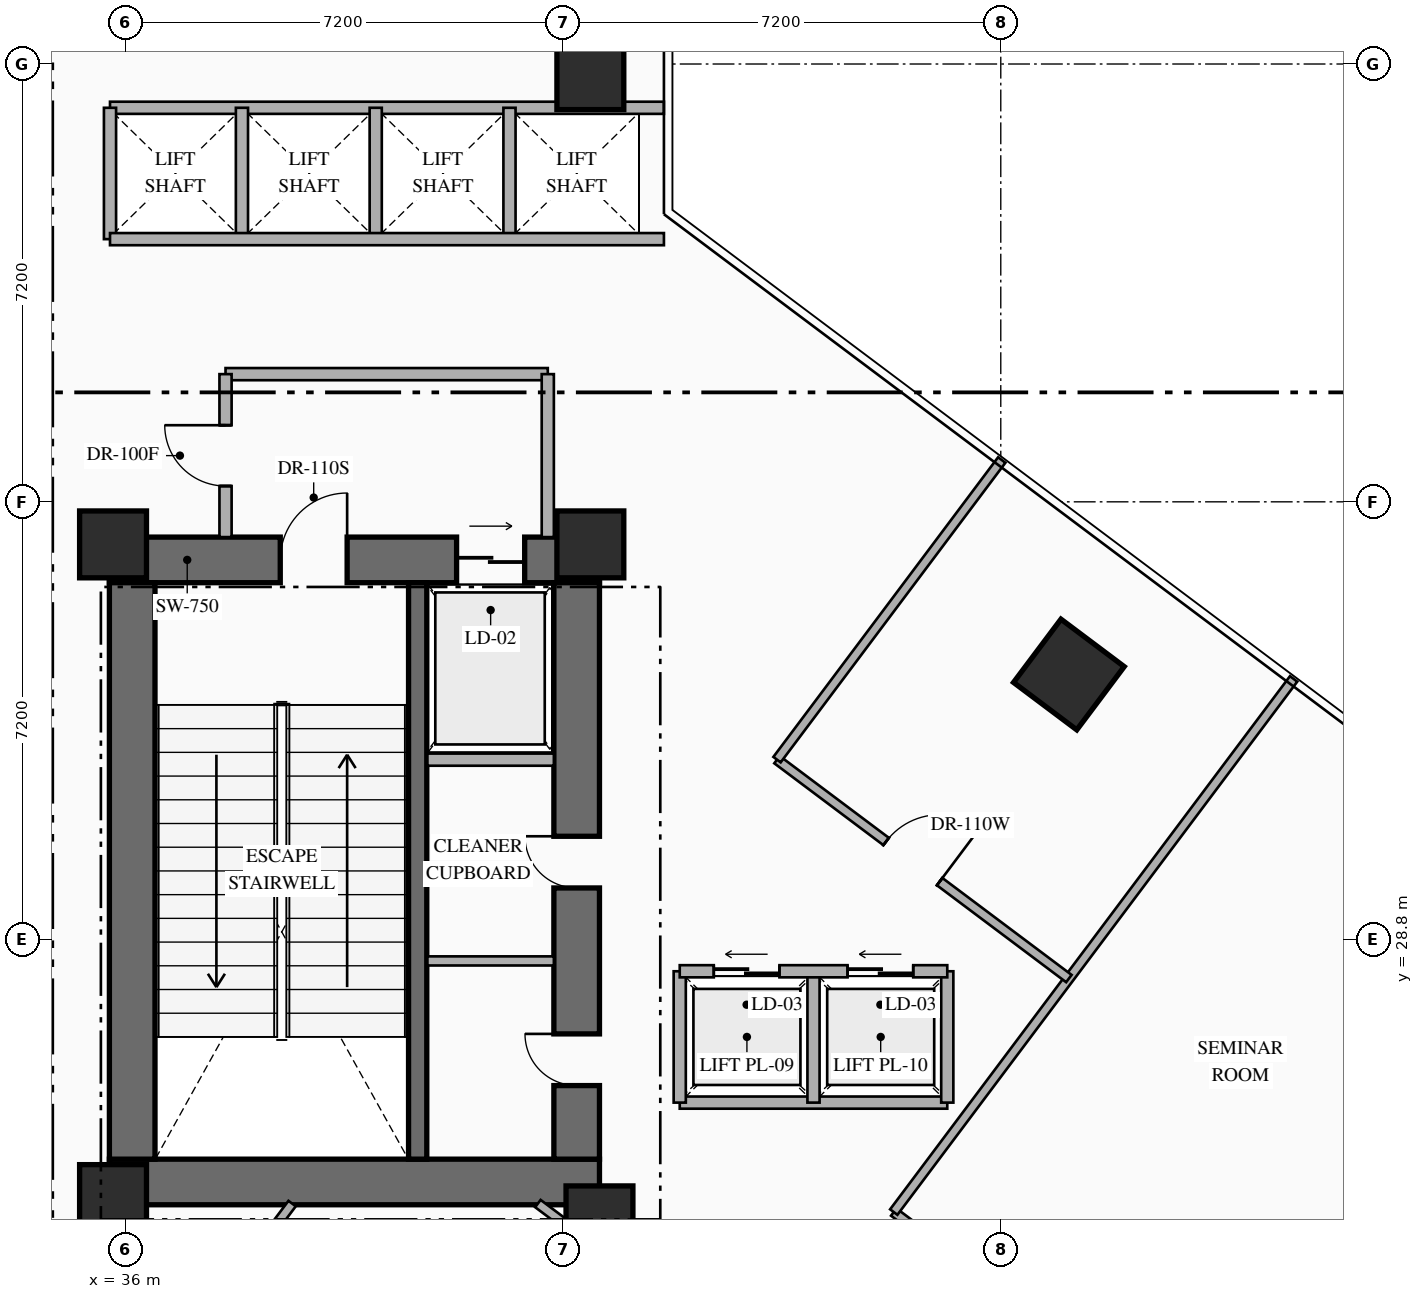
"""IFC4 building model, lengths in metres.
Left out: names, types, materials, properties, quantities, classifications, styles, units other than length and angle.
Written with IfcOpenShell. Run it as: python <this file> out.ifc"""

import sys

from ifc_helpers import new_model, si_unit, direction, frame, frame_2d, origin, origin_2d, place, context, subcontext, project, spatial, rectangle, extrude, element, fill, save


model = new_model("IFC4")
c1 = context("Model", 3, precision=1e-05, world=origin(), true_north=direction((0.0, 1.0)))
c2 = subcontext(c1, "Body", "Model", "MODEL_VIEW")
j1 = project(units=[si_unit("LENGTHUNIT", "METRE"), si_unit("PLANEANGLEUNIT", "RADIAN")], contexts=[c1])
p1 = place(None, origin())
s1 = spatial("IfcSite", under=j1, at=p1, CompositionType="ELEMENT")
p2 = place(p1, origin())
s2 = spatial("IfcBuilding", under=s1, at=p2, CompositionType="ELEMENT")
p3 = place(p2, frame((0.0, 0.0, 5.4)))
s3 = spatial("IfcBuildingStorey", under=s2, at=p3, CompositionType="ELEMENT", Elevation=5.4)
p4 = place(p3, frame((35.74, 24.815, 0.0), z_axis=(0.0, 0.0, 1.0), x_axis=(1.0, 0.0, 0.0)))
e1 = element("IfcWall", 1, at=p4, inside=s3, PredefinedType="SHEAR", context=c2, shape_type="SweptSolid", body=[
    extrude(rectangle(XDim=8.06, YDim=0.75, at=frame_2d((4.03, 0.0))), origin(), (0.0, 0.0, 1.0), 5.4),
])
p5 = place(p3, frame((35.74, 35.045, 0.0), z_axis=(0.0, 0.0, 1.0), x_axis=(1.0, 0.0, 0.0)))
e2 = element("IfcWall", 2, at=p5, inside=s3, PredefinedType="SHEAR", context=c2, shape_type="SweptSolid", body=[
    extrude(rectangle(XDim=8.06, YDim=0.75, at=frame_2d((4.03, 0.0))), origin(), (0.0, 0.0, 1.0), 5.4),
])
p6 = place(p5, frame((2.81, 0.0, 0.0)))
e3 = element("IfcOpeningElement", 3, at=p6, cuts=e2, PredefinedType="OPENING", context=c2, shape_type="SweptSolid", body=[
    extrude(rectangle(XDim=1.1, YDim=2.2, at=frame_2d((0.55, 1.1))), frame((0.0, 0.385, 0.0), z_axis=(0.0, -1.0, 0.0), x_axis=(1.0, 0.0, 0.0)), (0.0, 0.0, 1.0), 0.77),
])
p7 = place(p5, frame((5.71, 0.0, 0.0)))
e4 = element("IfcOpeningElement", 4, at=p7, cuts=e2, PredefinedType="OPENING", context=c2, shape_type="SweptSolid", body=[
    extrude(rectangle(XDim=1.12, YDim=2.15, at=frame_2d((0.56, 1.075))), frame((0.0, 0.385, 0.0), z_axis=(0.0, -1.0, 0.0), x_axis=(1.0, 0.0, 0.0)), (0.0, 0.0, 1.0), 0.77),
])
p8 = place(p3, frame((36.115, 25.19, 0.0), z_axis=(0.0, 0.0, 1.0), x_axis=(0.0, 1.0, 0.0)))
e5 = element("IfcWall", 5, at=p8, inside=s3, PredefinedType="SHEAR", context=c2, shape_type="SweptSolid", body=[
    extrude(rectangle(XDim=9.48, YDim=0.75, at=frame_2d((4.74, 0.0))), origin(), (0.0, 0.0, 1.0), 5.4),
])
p9 = place(p3, frame((43.425, 25.19, 0.0), z_axis=(0.0, 0.0, 1.0), x_axis=(0.0, 1.0, 0.0)))
e6 = element("IfcWall", 6, at=p9, inside=s3, PredefinedType="SHEAR", context=c2, shape_type="SweptSolid", body=[
    extrude(rectangle(XDim=9.48, YDim=0.75, at=frame_2d((4.74, 0.0))), origin(), (0.0, 0.0, 1.0), 5.4),
])
p10 = place(p9, frame((1.21, 0.0, 0.0)))
e7 = element("IfcOpeningElement", 7, at=p10, cuts=e6, PredefinedType="OPENING", context=c2, shape_type="SweptSolid", body=[
    extrude(rectangle(XDim=0.85, YDim=2.08, at=frame_2d((0.425, 1.04))), frame((0.0, 0.385, 0.0), z_axis=(0.0, -1.0, 0.0), x_axis=(1.0, 0.0, 0.0)), (0.0, 0.0, 1.0), 0.77),
])
p11 = place(p9, frame((4.46, 0.0, 0.0)))
e8 = element("IfcOpeningElement", 8, at=p11, cuts=e6, PredefinedType="OPENING", context=c2, shape_type="SweptSolid", body=[
    extrude(rectangle(XDim=0.85, YDim=2.08, at=frame_2d((0.425, 1.04))), frame((0.0, 0.385, 0.0), z_axis=(0.0, -1.0, 0.0), x_axis=(1.0, 0.0, 0.0)), (0.0, 0.0, 1.0), 0.77),
])
p12 = place(p3, frame((40.81, 25.19, 0.0), z_axis=(0.0, 0.0, 1.0), x_axis=(0.0, 1.0, 0.0)))
e9 = element("IfcWall", 9, at=p12, inside=s3, PredefinedType="SHEAR", context=c2, shape_type="SweptSolid", body=[
    extrude(rectangle(XDim=9.48, YDim=0.3, at=frame_2d((4.74, 0.0))), origin(), (0.0, 0.0, 1.0), 5.4),
])
for number, where, z_axis, x_axis in (
    (10, (35.8, 24.55, 0.0), (0.0, 0.0, 1.0), (1.0, 0.0, 0.0)),
    (11, (43.8, 24.2, 0.0), (0.0, 0.0, 1.0), (1.0, 0.0, 0.0)),
    (12, (35.8, 35.3, 0.0), (0.0, 0.0, 1.0), (1.0, 0.0, 0.0)),
    (13, (43.65, 35.3, 0.0), (0.0, 0.0, 1.0), (1.0, 0.0, 0.0)),
    (14, (43.65, 43.0, 0.0), (0.0, 0.0, 1.0), (1.0, 0.0, 0.0)),
):
    element("IfcColumn", number, at=place(p3, frame(where, z_axis=z_axis, x_axis=x_axis)), inside=s3, PredefinedType="COLUMN", context=c2, shape_type="SweptSolid", body=[
        extrude(rectangle(XDim=1.1, YDim=1.1, at=origin_2d()), origin(), (0.0, 0.0, 1.0), 5.4),
    ])
p13 = place(p3, frame((51.52, 33.16, 0.0), z_axis=(0.0, 0.0, 1.0), x_axis=(0.799999996291, -0.600000004945, 0.0)))
e15 = element("IfcColumn", 15, at=p13, inside=s3, PredefinedType="COLUMN", context=c2, shape_type="SweptSolid", body=[
    extrude(rectangle(XDim=1.3, YDim=1.3, at=origin_2d()), origin(), (0.0, 0.0, 1.0), 5.4),
])
p14 = place(p3, frame((40.97, 31.76, 0.0), z_axis=(0.0, 0.0, 1.0), x_axis=(1.0, 0.0, 0.0)))
e16 = element("IfcWall", 16, at=p14, inside=s3, PredefinedType="STANDARD", context=c2, shape_type="SweptSolid", body=[
    extrude(rectangle(XDim=2.08, YDim=0.2, at=frame_2d((1.04, 0.0))), origin(), (0.0, 0.0, 1.0), 5.1),
])
p15 = place(p3, frame((40.97, 28.45, 0.0), z_axis=(0.0, 0.0, 1.0), x_axis=(1.0, 0.0, 0.0)))
e17 = element("IfcWall", 17, at=p15, inside=s3, PredefinedType="PARTITIONING", context=c2, shape_type="SweptSolid", body=[
    extrude(rectangle(XDim=2.08, YDim=0.15, at=frame_2d((1.04, 0.0))), origin(), (0.0, 0.0, 1.0), 5.1),
])
p16 = place(p3, frame((37.65, 38.1, 0.0), z_axis=(0.0, 0.0, 1.0), x_axis=(1.0, 0.0, 0.0)))
e18 = element("IfcWall", 18, at=p16, inside=s3, PredefinedType="STANDARD", context=c2, shape_type="SweptSolid", body=[
    extrude(rectangle(XDim=5.3, YDim=0.2, at=frame_2d((2.65, 0.0))), origin(), (0.0, 0.0, 1.0), 5.1),
])
p17 = place(p3, frame((42.95, 35.42, 0.0), z_axis=(0.0, 0.0, 1.0), x_axis=(0.0, 1.0, 0.0)))
e19 = element("IfcWall", 19, at=p17, inside=s3, PredefinedType="STANDARD", context=c2, shape_type="SweptSolid", body=[
    extrude(rectangle(XDim=2.68, YDim=0.2, at=frame_2d((1.34, 0.0))), origin(), (0.0, 0.0, 1.0), 5.1),
])
p18 = place(p3, frame((37.65, 35.42, 0.0), z_axis=(0.0, 0.0, 1.0), x_axis=(0.0, 1.0, 0.0)))
e20 = element("IfcWall", 20, at=p18, inside=s3, PredefinedType="STANDARD", context=c2, shape_type="SweptSolid", body=[
    extrude(rectangle(XDim=2.68, YDim=0.2, at=frame_2d((1.34, 0.0))), origin(), (0.0, 0.0, 1.0), 5.1),
])
p19 = place(p18, frame((0.84, 0.0, 0.0)))
e21 = element("IfcOpeningElement", 21, at=p19, cuts=e20, PredefinedType="OPENING", context=c2, shape_type="SweptSolid", body=[
    extrude(rectangle(XDim=1.0, YDim=2.2, at=frame_2d((0.5, 1.1))), frame((0.0, 0.11, 0.0), z_axis=(0.0, -1.0, 0.0), x_axis=(1.0, 0.0, 0.0)), (0.0, 0.0, 1.0), 0.22),
])
p20 = place(p3, frame((35.75, 42.48, 0.0), z_axis=(0.0, 0.0, 1.0), x_axis=(1.0, 0.0, 0.0)))
e22 = element("IfcWall", 22, at=p20, inside=s3, PredefinedType="STANDARD", context=c2, shape_type="SweptSolid", body=[
    extrude(rectangle(XDim=9.11, YDim=0.2, at=frame_2d((4.555, 0.0))), origin(), (0.0, 0.0, 1.0), 5.1),
])
for number, where, z_axis, x_axis in (
    (23, (35.75, 40.32, 0.0), (0.0, 0.0, 1.0), (0.0, 1.0, 0.0)),
    (24, (37.92, 40.32, 0.0), (0.0, 0.0, 1.0), (0.0, 1.0, 0.0)),
    (25, (40.12, 40.32, 0.0), (0.0, 0.0, 1.0), (0.0, 1.0, 0.0)),
    (26, (42.32, 40.32, 0.0), (0.0, 0.0, 1.0), (0.0, 1.0, 0.0)),
):
    element("IfcWall", number, at=place(p3, frame(where, z_axis=z_axis, x_axis=x_axis)), inside=s3, PredefinedType="STANDARD", context=c2, shape_type="SweptSolid", body=[
        extrude(rectangle(XDim=2.16, YDim=0.2, at=frame_2d((1.08, 0.0))), origin(), (0.0, 0.0, 1.0), 5.1),
    ])
p21 = place(p3, frame((35.75, 40.32, 0.0), z_axis=(0.0, 0.0, 1.0), x_axis=(1.0, 0.0, 0.0)))
e27 = element("IfcWall", 27, at=p21, inside=s3, PredefinedType="STANDARD", context=c2, shape_type="SweptSolid", body=[
    extrude(rectangle(XDim=9.11, YDim=0.2, at=frame_2d((4.555, 0.0))), origin(), (0.0, 0.0, 1.0), 5.1),
])
p22 = place(p3, frame((45.12, 26.12, 0.0), z_axis=(0.0, 0.0, 1.0), x_axis=(1.0, 0.0, 0.0)))
e28 = element("IfcWall", 28, at=p22, inside=s3, PredefinedType="STANDARD", context=c2, shape_type="SweptSolid", body=[
    extrude(rectangle(XDim=4.4, YDim=0.2, at=frame_2d((2.2, 0.0))), origin(), (0.0, 0.0, 1.0), 5.1),
])
for number, where, z_axis, x_axis in (
    (29, (45.12, 26.12, 0.0), (0.0, 0.0, 1.0), (0.0, 1.0, 0.0)),
    (30, (49.52, 26.12, 0.0), (0.0, 0.0, 1.0), (0.0, 1.0, 0.0)),
    (31, (47.32, 26.12, 0.0), (0.0, 0.0, 1.0), (0.0, 1.0, 0.0)),
):
    element("IfcWall", number, at=place(p3, frame(where, z_axis=z_axis, x_axis=x_axis)), inside=s3, PredefinedType="STANDARD", context=c2, shape_type="SweptSolid", body=[
        extrude(rectangle(XDim=2.16, YDim=0.2, at=frame_2d((1.08, 0.0))), origin(), (0.0, 0.0, 1.0), 5.1),
    ])
p23 = place(p3, frame((45.12, 28.28, 0.0), z_axis=(0.0, 0.0, 1.0), x_axis=(1.0, 0.0, 0.0)))
e32 = element("IfcWall", 32, at=p23, inside=s3, PredefinedType="STANDARD", context=c2, shape_type="SweptSolid", body=[
    extrude(rectangle(XDim=4.4, YDim=0.2, at=frame_2d((2.2, 0.0))), origin(), (0.0, 0.0, 1.0), 5.1),
])
p24 = place(p23, frame((0.56, 0.0, 0.0)))
e33 = element("IfcOpeningElement", 33, at=p24, cuts=e32, PredefinedType="OPENING", context=c2, shape_type="SweptSolid", body=[
    extrude(rectangle(XDim=1.08, YDim=2.15, at=frame_2d((0.54, 1.075))), frame((0.0, 0.11, 0.0), z_axis=(0.0, -1.0, 0.0), x_axis=(1.0, 0.0, 0.0)), (0.0, 0.0, 1.0), 0.22),
])
p25 = place(p23, frame((2.76, 0.0, 0.0)))
e34 = element("IfcOpeningElement", 34, at=p25, cuts=e32, PredefinedType="OPENING", context=c2, shape_type="SweptSolid", body=[
    extrude(rectangle(XDim=1.08, YDim=2.15, at=frame_2d((0.54, 1.075))), frame((0.0, 0.11, 0.0), z_axis=(0.0, -1.0, 0.0), x_axis=(1.0, 0.0, 0.0)), (0.0, 0.0, 1.0), 0.22),
])
p26 = place(p3, frame((48.64, 24.32, 0.0), z_axis=(0.0, 0.0, 1.0), x_axis=(0.80000474051, -0.599993679268, 0.0)))
e35 = element("IfcWall", 35, at=p26, inside=s3, PredefinedType="PARTITIONING", context=c2, shape_type="SweptSolid", body=[
    extrude(rectangle(XDim=6.18, YDim=0.15, at=frame_2d((3.09, 0.0))), origin(), (0.0, 0.0, 1.0), 5.1),
])
p27 = place(p26, frame((2.59, 0.0, 0.0)))
e36 = element("IfcOpeningElement", 36, at=p27, cuts=e35, PredefinedType="OPENING", context=c2, shape_type="SweptSolid", body=[
    extrude(rectangle(XDim=1.0, YDim=2.15, at=frame_2d((0.5, 1.075))), frame((0.0, 0.085, 0.0), z_axis=(0.0, -1.0, 0.0), x_axis=(1.0, 0.0, 0.0)), (0.0, 0.0, 1.0), 0.17),
])
p28 = place(p3, frame((48.64, 24.32, 0.0), z_axis=(0.0, 0.0, 1.0), x_axis=(0.600017820398, 0.799986634391, 0.0)))
e37 = element("IfcWall", 37, at=p28, inside=s3, PredefinedType="PARTITIONING", context=c2, shape_type="SweptSolid", body=[
    extrude(rectangle(XDim=10.96, YDim=0.15, at=frame_2d((5.48, 0.0))), origin(), (0.0, 0.0, 1.0), 5.1),
])
p29 = place(p3, frame((53.584, 20.612, 0.0), z_axis=(0.0, 0.0, 1.0), x_axis=(0.600003564151, 0.799997326874, 0.0)))
e38 = element("IfcWall", 38, at=p29, inside=s3, PredefinedType="PARTITIONING", context=c2, shape_type="SweptSolid", body=[
    extrude(rectangle(XDim=10.96, YDim=0.15, at=frame_2d((5.48, 0.0))), origin(), (0.0, 0.0, 1.0), 5.1),
])
p30 = place(p3, frame((46.72, 31.76, 0.0), z_axis=(0.0, 0.0, 1.0), x_axis=(0.79999511724, -0.600006510291, 0.0)))
e39 = element("IfcWall", 39, at=p30, inside=s3, PredefinedType="PARTITIONING", context=c2, shape_type="SweptSolid", body=[
    extrude(rectangle(XDim=6.0, YDim=0.15, at=frame_2d((3.0, 0.0))), origin(), (0.0, 0.0, 1.0), 5.1),
])
p31 = place(p30, frame((2.243, 0.0, 0.0)))
e40 = element("IfcOpeningElement", 40, at=p31, cuts=e39, PredefinedType="OPENING", context=c2, shape_type="SweptSolid", body=[
    extrude(rectangle(XDim=1.1, YDim=2.16, at=frame_2d((0.55, 1.08))), frame((0.0, 0.085, 0.0), z_axis=(0.0, -1.0, 0.0), x_axis=(1.0, 0.0, 0.0)), (0.0, 0.0, 1.0), 0.17),
])
p32 = place(p3, frame((46.72, 31.76, 0.0), z_axis=(0.0, 0.0, 1.0), x_axis=(0.600006341286, 0.799995243996, 0.0)))
e41 = element("IfcWall", 41, at=p32, inside=s3, PredefinedType="PARTITIONING", context=c2, shape_type="SweptSolid", body=[
    extrude(rectangle(XDim=6.16, YDim=0.15, at=frame_2d((3.08, 0.0))), origin(), (0.0, 0.0, 1.0), 5.1),
])
p33 = place(p3, frame((42.787, 24.46, 0.0), z_axis=(0.0, 0.0, 1.0), x_axis=(0.799971872363, -0.600037501685, 0.0)))
e42 = element("IfcWall", 42, at=p33, inside=s3, PredefinedType="PARTITIONING", context=c2, shape_type="SweptSolid", body=[
    extrude(rectangle(XDim=4.167, YDim=0.15, at=frame_2d((2.083, 0.0))), origin(), (0.0, 0.0, 1.0), 5.1),
])
p34 = place(p33, frame((2.468, 0.0, 0.0)))
e43 = element("IfcOpeningElement", 43, at=p34, cuts=e42, PredefinedType="OPENING", context=c2, shape_type="SweptSolid", body=[
    extrude(rectangle(XDim=0.95, YDim=2.15, at=frame_2d((0.475, 1.075))), frame((0.0, 0.085, 0.0), z_axis=(0.0, -1.0, 0.0), x_axis=(1.0, 0.0, 0.0)), (0.0, 0.0, 1.0), 0.17),
])
p35 = place(p3, frame((33.384, 17.312, 0.0), z_axis=(0.0, 0.0, 1.0), x_axis=(0.600008743659, 0.799993442181, 0.0)))
e44 = element("IfcWall", 44, at=p35, inside=s3, PredefinedType="PARTITIONING", context=c2, shape_type="SweptSolid", body=[
    extrude(rectangle(XDim=8.935, YDim=0.15, at=frame_2d((4.468, 0.0))), origin(), (0.0, 0.0, 1.0), 5.1),
])
p36 = place(p6, origin())
e45 = element("IfcDoor", 45, at=p36, inside=s3, OperationType="SINGLE_SWING_RIGHT", PredefinedType="DOOR", context=c2, shape_type="SweptSolid", body=[
    extrude(rectangle(XDim=1.1, YDim=2.2, at=frame_2d((0.55, 1.1))), frame((0.0, 0.025, 0.0), z_axis=(0.0, -1.0, 0.0), x_axis=(1.0, 0.0, 0.0)), (0.0, 0.0, 1.0), 0.05),
])
fill(e3, e45)
p37 = place(p7, origin())
e46 = element("IfcDoor", 46, at=p37, inside=s3, OperationType="SLIDING_TO_RIGHT", PredefinedType="USERDEFINED", context=c2, shape_type="SweptSolid", body=[
    extrude(rectangle(XDim=1.12, YDim=2.15, at=frame_2d((0.56, 1.075))), frame((0.0, 0.025, 0.0), z_axis=(0.0, -1.0, 0.0), x_axis=(1.0, 0.0, 0.0)), (0.0, 0.0, 1.0), 0.05),
])
fill(e4, e46)
p38 = place(p10, origin())
e47 = element("IfcDoor", 47, at=p38, inside=s3, OperationType="SINGLE_SWING_RIGHT", PredefinedType="DOOR", context=c2, shape_type="SweptSolid", body=[
    extrude(rectangle(XDim=0.85, YDim=2.08, at=frame_2d((0.425, 1.04))), frame((0.0, 0.025, 0.0), z_axis=(0.0, -1.0, 0.0), x_axis=(1.0, 0.0, 0.0)), (0.0, 0.0, 1.0), 0.05),
])
fill(e7, e47)
p39 = place(p11, origin())
e48 = element("IfcDoor", 48, at=p39, inside=s3, OperationType="SINGLE_SWING_RIGHT", PredefinedType="DOOR", context=c2, shape_type="SweptSolid", body=[
    extrude(rectangle(XDim=0.85, YDim=2.08, at=frame_2d((0.425, 1.04))), frame((0.0, 0.025, 0.0), z_axis=(0.0, -1.0, 0.0), x_axis=(1.0, 0.0, 0.0)), (0.0, 0.0, 1.0), 0.05),
])
fill(e8, e48)
p40 = place(p19, origin())
e49 = element("IfcDoor", 49, at=p40, inside=s3, OperationType="SINGLE_SWING_RIGHT", PredefinedType="DOOR", context=c2, shape_type="SweptSolid", body=[
    extrude(rectangle(XDim=1.0, YDim=2.2, at=frame_2d((0.5, 1.1))), frame((0.0, 0.025, 0.0), z_axis=(0.0, -1.0, 0.0), x_axis=(1.0, 0.0, 0.0)), (0.0, 0.0, 1.0), 0.05),
])
fill(e21, e49)
p41 = place(p24, origin())
e50 = element("IfcDoor", 50, at=p41, inside=s3, OperationType="SLIDING_TO_LEFT", PredefinedType="USERDEFINED", context=c2, shape_type="SweptSolid", body=[
    extrude(rectangle(XDim=1.08, YDim=2.15, at=frame_2d((0.54, 1.075))), frame((0.0, 0.025, 0.0), z_axis=(0.0, -1.0, 0.0), x_axis=(1.0, 0.0, 0.0)), (0.0, 0.0, 1.0), 0.05),
])
fill(e33, e50)
p42 = place(p25, origin())
e51 = element("IfcDoor", 51, at=p42, inside=s3, OperationType="SLIDING_TO_LEFT", PredefinedType="USERDEFINED", context=c2, shape_type="SweptSolid", body=[
    extrude(rectangle(XDim=1.08, YDim=2.15, at=frame_2d((0.54, 1.075))), frame((0.0, 0.025, 0.0), z_axis=(0.0, -1.0, 0.0), x_axis=(1.0, 0.0, 0.0)), (0.0, 0.0, 1.0), 0.05),
])
fill(e34, e51)
p43 = place(p31, origin())
e52 = element("IfcDoor", 52, at=p43, inside=s3, OperationType="SINGLE_SWING_RIGHT", PredefinedType="DOOR", context=c2, shape_type="SweptSolid", body=[
    extrude(rectangle(XDim=1.1, YDim=2.16, at=frame_2d((0.55, 1.08))), frame((0.0, 0.025, 0.0), z_axis=(0.0, -1.0, 0.0), x_axis=(1.0, 0.0, 0.0)), (0.0, 0.0, 1.0), 0.05),
])
fill(e40, e52)
save(model, sys.argv[1])
